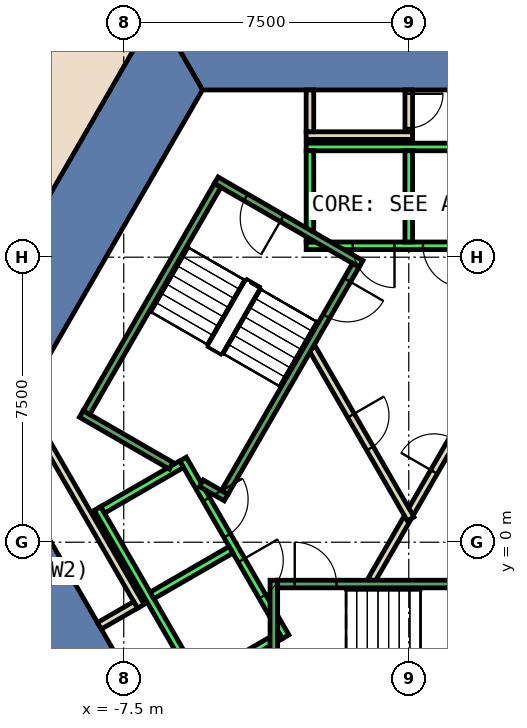
"""IFC4 building model, lengths in metres.
Left out: names, types, materials, properties, quantities, classifications, styles, units other than length and angle.
Written with IfcOpenShell. Run it as: python <this file> out.ifc"""

import sys

from ifc_helpers import new_model, si_unit, direction, frame, frame_2d, origin, place, context, subcontext, project, spatial, polyline, rectangle, outline, extrude, element, fill, save


model = new_model("IFC4")
c1 = context("Model", 3, precision=1e-05, world=origin(), true_north=direction((0.0, 1.0)))
c2 = subcontext(c1, "Body", "Model", "MODEL_VIEW")
j1 = project(units=[si_unit("LENGTHUNIT", "METRE"), si_unit("PLANEANGLEUNIT", "RADIAN")], contexts=[c1])
p1 = place(None, origin())
s1 = spatial("IfcSite", under=j1, at=p1, CompositionType="ELEMENT")
p2 = place(p1, origin())
s2 = spatial("IfcBuilding", under=s1, at=p2, CompositionType="ELEMENT")
p3 = place(p2, frame((0.0, 0.0, 236.0)))
s3 = spatial("IfcBuildingStorey", under=s2, at=p3, CompositionType="ELEMENT", Elevation=236.0)
p4 = place(p3, frame((0.0, 0.0, -0.6)))
e1 = element("IfcWall", 1, at=p4, inside=s3, PredefinedType="SHEAR", context=c2, shape_type="SweptSolid", body=[
    extrude(outline(polyline([(6.64, 14.0), (-6.64, 14.0), (-5.427, 11.9), (5.427, 11.9), (6.64, 14.0)])), origin(), (0.0, 0.0, 1.0), 5.4),
])
p5 = place(p3, frame((0.0, 0.0, -0.6)))
e2 = element("IfcWall", 2, at=p5, inside=s3, PredefinedType="SHEAR", context=c2, shape_type="SweptSolid", body=[
    extrude(outline(polyline([(-11.834, 5.002), (-10.016, 3.952), (-5.427, 11.9), (-6.64, 14.0), (-11.834, 5.002)])), origin(), (0.0, 0.0, 1.0), 5.4),
])
p6 = place(p3, frame((0.0, 0.0, -0.6)))
e3 = element("IfcWall", 3, at=p6, inside=s3, PredefinedType="SHEAR", context=c2, shape_type="SweptSolid", body=[
    extrude(outline(polyline([(-13.279, 2.5), (-6.64, -9.0), (-5.427, -6.9), (-10.854, 2.5), (-13.279, 2.5)])), origin(), (0.0, 0.0, 1.0), 5.4),
])
p7 = place(p3, frame((0.0, 11.9, 0.0), z_axis=(0.0, 0.0, 1.0), x_axis=(0.0, -1.0, 0.0)))
e4 = element("IfcWall", 4, at=p7, inside=s3, PredefinedType="PARTITIONING", context=c2, shape_type="SweptSolid", body=[
    extrude(rectangle(XDim=1.1, YDim=0.2, at=frame_2d((0.55, 0.0))), origin(), (0.0, 0.0, 1.0), 4.8),
])
p8 = place(p7, frame((0.1, 0.0, 0.0)))
e5 = element("IfcOpeningElement", 5, at=p8, cuts=e4, PredefinedType="OPENING", context=c2, shape_type="SweptSolid", body=[
    extrude(rectangle(XDim=0.9, YDim=2.1, at=frame_2d((0.45, 1.05))), frame((0.0, 0.11, 0.0), z_axis=(0.0, -1.0, 0.0), x_axis=(1.0, 0.0, 0.0)), (0.0, 0.0, 1.0), 0.22),
])
p9 = place(p3, frame((0.1, 10.7, 0.0), z_axis=(0.0, 0.0, 1.0), x_axis=(-1.0, 0.0, 0.0)))
e6 = element("IfcWall", 6, at=p9, inside=s3, PredefinedType="PARTITIONING", context=c2, shape_type="SweptSolid", body=[
    extrude(rectangle(XDim=2.8, YDim=0.2, at=frame_2d((1.4, 0.0))), origin(), (0.0, 0.0, 1.0), 4.8),
])
p10 = place(p3, frame((-2.6, 10.8, 0.0), z_axis=(0.0, 0.0, 1.0), x_axis=(0.0, 1.0, 0.0)))
e7 = element("IfcWall", 7, at=p10, inside=s3, PredefinedType="PARTITIONING", context=c2, shape_type="SweptSolid", body=[
    extrude(rectangle(XDim=1.1, YDim=0.2, at=frame_2d((0.55, 0.0))), origin(), (0.0, 0.0, 1.0), 4.8),
])
p11 = place(p3, frame((-9.751, 2.99, 0.0), z_axis=(0.0, 0.0, 1.0), x_axis=(0.499955951776, -0.866050833545, 0.0)))
e8 = element("IfcWall", 8, at=p11, inside=s3, PredefinedType="PARTITIONING", context=c2, shape_type="SweptSolid", body=[
    extrude(rectangle(XDim=5.4, YDim=0.2, at=frame_2d((2.7, 0.0))), origin(), (0.0, 0.0, 1.0), 4.8),
])
p12 = place(p3, frame((-7.188, -1.65, 0.0), z_axis=(0.0, 0.0, 1.0), x_axis=(-0.865841558281, -0.500318294642, 0.0)))
e9 = element("IfcWall", 9, at=p12, inside=s3, PredefinedType="PARTITIONING", context=c2, shape_type="SweptSolid", body=[
    extrude(rectangle(XDim=1.099, YDim=0.2, at=frame_2d((0.55, 0.0))), origin(), (0.0, 0.0, 1.0), 4.8),
])
p13 = place(p3, frame((-0.982, -1.0, 0.0), z_axis=(0.0, 0.0, 1.0), x_axis=(0.50024047865, 0.865886518847, 0.0)))
e10 = element("IfcWall", 10, at=p13, inside=s3, PredefinedType="PARTITIONING", context=c2, shape_type="SweptSolid", body=[
    extrude(rectangle(XDim=1.863, YDim=0.2, at=frame_2d((0.931, 0.0))), origin(), (0.0, 0.0, 1.0), 4.8),
])
p14 = place(p3, frame((0.05, 0.787, 0.0), z_axis=(0.0, 0.0, 1.0), x_axis=(0.499954076797, 0.866051915934, 0.0)))
e11 = element("IfcWall", 11, at=p14, inside=s3, PredefinedType="PARTITIONING", context=c2, shape_type="SweptSolid", body=[
    extrude(rectangle(XDim=3.558, YDim=0.2, at=frame_2d((1.779, 0.0))), origin(), (0.0, 0.0, 1.0), 4.8),
])
p15 = place(p14, frame((1.229, 0.0, 0.0)))
e12 = element("IfcOpeningElement", 12, at=p15, cuts=e11, PredefinedType="OPENING", context=c2, shape_type="SweptSolid", body=[
    extrude(rectangle(XDim=1.0, YDim=2.1, at=frame_2d((0.5, 1.05))), frame((0.0, 0.11, 0.0), z_axis=(0.0, -1.0, 0.0), x_axis=(1.0, 0.0, 0.0)), (0.0, 0.0, 1.0), 0.22),
])
p16 = place(p3, frame((-2.54, 5.1, 0.0), z_axis=(0.0, 0.0, 1.0), x_axis=(0.499925051871, -0.866068670783, 0.0)))
e13 = element("IfcWall", 13, at=p16, inside=s3, PredefinedType="PARTITIONING", context=c2, shape_type="SweptSolid", body=[
    extrude(rectangle(XDim=5.181, YDim=0.2, at=frame_2d((2.59, 0.0))), origin(), (0.0, 0.0, 1.0), 4.8),
])
p17 = place(p16, frame((2.04, 0.0, 0.0)))
e14 = element("IfcOpeningElement", 14, at=p17, cuts=e13, PredefinedType="OPENING", context=c2, shape_type="SweptSolid", body=[
    extrude(rectangle(XDim=1.0, YDim=2.1, at=frame_2d((0.5, 1.05))), frame((0.0, 0.11, 0.0), z_axis=(0.0, -1.0, 0.0), x_axis=(1.0, 0.0, 0.0)), (0.0, 0.0, 1.0), 0.22),
])
p18 = place(p3, frame((-12.57, 8.528, 0.0), z_axis=(0.0, 0.0, 1.0), x_axis=(0.499907967521, 0.866078532241, 0.0)))
e15 = element("IfcWall", 15, at=p18, inside=s3, PredefinedType="PARTITIONING", context=c2, shape_type="SweptSolid", body=[
    extrude(rectangle(XDim=9.19, YDim=0.2, at=frame_2d((4.595, 0.0))), origin(), (0.0, 0.0, 1.0), 4.8),
])
p19 = place(p18, frame((7.535, 0.0, 0.0)))
e16 = element("IfcOpeningElement", 16, at=p19, cuts=e15, PredefinedType="OPENING", context=c2, shape_type="SweptSolid", body=[
    extrude(rectangle(XDim=1.0, YDim=2.1, at=frame_2d((0.5, 1.05))), frame((0.0, 0.11, 0.0), z_axis=(0.0, -1.0, 0.0), x_axis=(1.0, 0.0, 0.0)), (0.0, 0.0, 1.0), 0.22),
])
p20 = place(p3, frame((2.7, 7.8, 0.0), z_axis=(0.0, 0.0, 1.0), x_axis=(-1.0, 0.0, 0.0)))
e17 = element("IfcWall", 17, at=p20, inside=s3, PredefinedType="STANDARD", context=c2, shape_type="SweptSolid", body=[
    extrude(rectangle(XDim=5.4, YDim=0.2, at=frame_2d((2.7, 0.0))), origin(), (0.0, 0.0, 1.0), 4.8),
])
p21 = place(p20, frame((1.225, 0.0, 0.0)))
e18 = element("IfcOpeningElement", 18, at=p21, cuts=e17, PredefinedType="OPENING", context=c2, shape_type="SweptSolid", body=[
    extrude(rectangle(XDim=1.1, YDim=2.1, at=frame_2d((0.55, 1.05))), frame((0.0, 0.11, 0.0), z_axis=(0.0, -1.0, 0.0), x_axis=(1.0, 0.0, 0.0)), (0.0, 0.0, 1.0), 0.22),
])
p22 = place(p20, frame((3.075, 0.0, 0.0)))
e19 = element("IfcOpeningElement", 19, at=p22, cuts=e17, PredefinedType="OPENING", context=c2, shape_type="SweptSolid", body=[
    extrude(rectangle(XDim=1.1, YDim=2.1, at=frame_2d((0.55, 1.05))), frame((0.0, 0.11, 0.0), z_axis=(0.0, -1.0, 0.0), x_axis=(1.0, 0.0, 0.0)), (0.0, 0.0, 1.0), 0.22),
])
p23 = place(p3, frame((2.7, 10.4, 0.0), z_axis=(0.0, 0.0, 1.0), x_axis=(-1.0, 0.0, 0.0)))
e20 = element("IfcWall", 20, at=p23, inside=s3, PredefinedType="STANDARD", context=c2, shape_type="SweptSolid", body=[
    extrude(rectangle(XDim=5.4, YDim=0.2, at=frame_2d((2.7, 0.0))), origin(), (0.0, 0.0, 1.0), 4.8),
])
for number, where, z_axis, x_axis in (
    (21, (0.0, 7.9, 0.0), (0.0, 0.0, 1.0), (0.0, 1.0, 0.0)),
    (22, (-2.6, 7.9, 0.0), (0.0, 0.0, 1.0), (0.0, 1.0, 0.0)),
):
    element("IfcWall", number, at=place(p3, frame(where, z_axis=z_axis, x_axis=x_axis)), inside=s3, PredefinedType="STANDARD", context=c2, shape_type="SweptSolid", body=[
        extrude(rectangle(XDim=2.4, YDim=0.2, at=frame_2d((1.2, 0.0))), origin(), (0.0, 0.0, 1.0), 4.8),
    ])
p24 = place(p3, frame((-5.94, 2.188, 0.0), z_axis=(0.0, 0.0, 1.0), x_axis=(0.500034260056, -0.866005622828, 0.0)))
e23 = element("IfcWall", 23, at=p24, inside=s3, PredefinedType="STANDARD", context=c2, shape_type="SweptSolid", body=[
    extrude(rectangle(XDim=5.399, YDim=0.2, at=frame_2d((2.7, 0.0))), origin(), (0.0, 0.0, 1.0), 4.8),
])
p25 = place(p24, frame((3.075, 0.0, 0.0)))
e24 = element("IfcOpeningElement", 24, at=p25, cuts=e23, PredefinedType="OPENING", context=c2, shape_type="SweptSolid", body=[
    extrude(rectangle(XDim=1.1, YDim=2.1, at=frame_2d((0.55, 1.05))), frame((0.0, 0.11, 0.0), z_axis=(0.0, -1.0, 0.0), x_axis=(1.0, 0.0, 0.0)), (0.0, 0.0, 1.0), 0.22),
])
p26 = place(p24, frame((1.225, 0.0, 0.0)))
e25 = element("IfcOpeningElement", 25, at=p26, cuts=e23, PredefinedType="OPENING", context=c2, shape_type="SweptSolid", body=[
    extrude(rectangle(XDim=1.1, YDim=2.1, at=frame_2d((0.55, 1.05))), frame((0.0, 0.11, 0.0), z_axis=(0.0, -1.0, 0.0), x_axis=(1.0, 0.0, 0.0)), (0.0, 0.0, 1.0), 0.22),
])
p27 = place(p3, frame((-8.192, 0.888, 0.0), z_axis=(0.0, 0.0, 1.0), x_axis=(0.500034260056, -0.866005622828, 0.0)))
e26 = element("IfcWall", 26, at=p27, inside=s3, PredefinedType="STANDARD", context=c2, shape_type="SweptSolid", body=[
    extrude(rectangle(XDim=5.399, YDim=0.2, at=frame_2d((2.7, 0.0))), origin(), (0.0, 0.0, 1.0), 4.8),
])
for number, where, z_axis, x_axis in (
    (27, (-5.977, 2.052, 0.0), (0.0, 0.0, 1.0), (-0.866, -0.5, 0.0)),
    (28, (-4.677, -0.2, 0.0), (0.0, 0.0, 1.0), (-0.866, -0.5, 0.0)),
):
    element("IfcWall", number, at=place(p3, frame(where, z_axis=z_axis, x_axis=x_axis)), inside=s3, PredefinedType="STANDARD", context=c2, shape_type="SweptSolid", body=[
        extrude(rectangle(XDim=2.399, YDim=0.2, at=frame_2d((1.2, 0.0))), origin(), (0.0, 0.0, 1.0), 4.8),
    ])
p28 = place(p3, frame((-3.377, -2.452, 0.0), z_axis=(0.0, 0.0, 1.0), x_axis=(-0.865955154139, -0.50012165622, 0.0)))
e29 = element("IfcWall", 29, at=p28, inside=s3, PredefinedType="STANDARD", context=c2, shape_type="SweptSolid", body=[
    extrude(rectangle(XDim=2.4, YDim=0.2, at=frame_2d((1.2, 0.0))), origin(), (0.0, 0.0, 1.0), 4.8),
])
p29 = place(p3, frame((-3.55, -1.0, 0.0), z_axis=(0.0, 0.0, 1.0), x_axis=(0.0, -1.0, 0.0)))
e30 = element("IfcWall", 30, at=p29, inside=s3, PredefinedType="STANDARD", context=c2, shape_type="SweptSolid", body=[
    extrude(rectangle(XDim=4.4, YDim=0.2, at=frame_2d((2.2, 0.0))), origin(), (0.0, 0.0, 1.0), 4.8),
])
p30 = place(p29, frame((2.4, 0.0, 0.0)))
e31 = element("IfcOpeningElement", 31, at=p30, cuts=e30, PredefinedType="OPENING", context=c2, shape_type="SweptSolid", body=[
    extrude(rectangle(XDim=1.1, YDim=2.2, at=frame_2d((0.55, 1.1))), frame((0.0, 0.11, 0.0), z_axis=(0.0, -1.0, 0.0), x_axis=(1.0, 0.0, 0.0)), (0.0, 0.0, 1.0), 0.22),
])
p31 = place(p3, frame((-3.45, -1.1, 0.0), z_axis=(0.0, 0.0, 1.0), x_axis=(1.0, 0.0, 0.0)))
e32 = element("IfcWall", 32, at=p31, inside=s3, PredefinedType="STANDARD", context=c2, shape_type="SweptSolid", body=[
    extrude(rectangle(XDim=6.9, YDim=0.2, at=frame_2d((3.45, 0.0))), origin(), (0.0, 0.0, 1.0), 4.8),
])
p32 = place(p31, frame((0.45, 0.0, 0.0)))
e33 = element("IfcOpeningElement", 33, at=p32, cuts=e32, PredefinedType="OPENING", context=c2, shape_type="SweptSolid", body=[
    extrude(rectangle(XDim=1.1, YDim=2.2, at=frame_2d((0.55, 1.1))), frame((0.0, 0.11, 0.0), z_axis=(0.0, -1.0, 0.0), x_axis=(1.0, 0.0, 0.0)), (0.0, 0.0, 1.0), 0.22),
])
p33 = place(p3, frame((-1.256, 7.324, 0.0), z_axis=(0.0, 0.0, 1.0), x_axis=(-0.866046073146, 0.499964197906, 0.0)))
e34 = element("IfcWall", 34, at=p33, inside=s3, PredefinedType="STANDARD", context=c2, shape_type="SweptSolid", body=[
    extrude(rectangle(XDim=4.4, YDim=0.2, at=frame_2d((2.2, 0.0))), origin(), (0.0, 0.0, 1.0), 4.8),
])
p34 = place(p33, frame((2.4, 0.0, 0.0)))
e35 = element("IfcOpeningElement", 35, at=p34, cuts=e34, PredefinedType="OPENING", context=c2, shape_type="SweptSolid", body=[
    extrude(rectangle(XDim=1.1, YDim=2.2, at=frame_2d((0.55, 1.1))), frame((0.0, 0.11, 0.0), z_axis=(0.0, -1.0, 0.0), x_axis=(1.0, 0.0, 0.0)), (0.0, 0.0, 1.0), 0.22),
])
p35 = place(p3, frame((-6.25, 2.01, 0.0), z_axis=(0.0, 0.0, 1.0), x_axis=(-0.86611865017, 0.499838457731, 0.0)))
e36 = element("IfcWall", 36, at=p35, inside=s3, PredefinedType="STANDARD", context=c2, shape_type="SweptSolid", body=[
    extrude(rectangle(XDim=2.733, YDim=0.2, at=frame_2d((1.366, 0.0))), origin(), (0.0, 0.0, 1.0), 4.8),
])
p36 = place(p3, frame((-4.806, 1.176, 0.0), z_axis=(0.0, 0.0, 1.0), x_axis=(-0.866558586415, 0.499075361355, 0.0)))
e37 = element("IfcWall", 37, at=p36, inside=s3, PredefinedType="STANDARD", context=c2, shape_type="SweptSolid", body=[
    extrude(rectangle(XDim=0.751, YDim=0.2, at=frame_2d((0.376, 0.0))), origin(), (0.0, 0.0, 1.0), 4.8),
])
p37 = place(p3, frame((-1.393, 7.288, 0.0), z_axis=(0.0, 0.0, 1.0), x_axis=(-0.499963383562, -0.866046543262, 0.0)))
e38 = element("IfcWall", 38, at=p37, inside=s3, PredefinedType="STANDARD", context=c2, shape_type="SweptSolid", body=[
    extrude(rectangle(XDim=6.9, YDim=0.2, at=frame_2d((3.45, 0.0))), origin(), (0.0, 0.0, 1.0), 4.8),
])
p38 = place(p37, frame((0.45, 0.0, 0.0)))
e39 = element("IfcOpeningElement", 39, at=p38, cuts=e38, PredefinedType="OPENING", context=c2, shape_type="SweptSolid", body=[
    extrude(rectangle(XDim=1.1, YDim=2.2, at=frame_2d((0.55, 1.1))), frame((0.0, 0.11, 0.0), z_axis=(0.0, -1.0, 0.0), x_axis=(1.0, 0.0, 0.0)), (0.0, 0.0, 1.0), 0.22),
])
p39 = place(p3, frame((-5.03, 9.388, 0.0), z_axis=(0.0, 0.0, 1.0), x_axis=(-0.499978703459, -0.866037698999, 0.0)))
e40 = element("IfcWall", 40, at=p39, inside=s3, PredefinedType="STANDARD", context=c2, shape_type="SweptSolid", body=[
    extrude(rectangle(XDim=6.9, YDim=0.2, at=frame_2d((3.45, 0.0))), origin(), (0.0, 0.0, 1.0), 4.8),
])
p40 = place(p15, origin())
e41 = element("IfcDoor", 41, at=p40, inside=s3, OperationType="SINGLE_SWING_RIGHT", PredefinedType="DOOR", context=c2, shape_type="SweptSolid", body=[
    extrude(rectangle(XDim=1.0, YDim=2.1, at=frame_2d((0.5, 1.05))), frame((0.0, 0.025, 0.0), z_axis=(0.0, -1.0, 0.0), x_axis=(1.0, 0.0, 0.0)), (0.0, 0.0, 1.0), 0.05),
])
fill(e12, e41)
p41 = place(p17, origin())
e42 = element("IfcDoor", 42, at=p41, inside=s3, OperationType="SINGLE_SWING_RIGHT", PredefinedType="DOOR", context=c2, shape_type="SweptSolid", body=[
    extrude(rectangle(XDim=1.0, YDim=2.1, at=frame_2d((0.5, 1.05))), frame((0.0, 0.025, 0.0), z_axis=(0.0, -1.0, 0.0), x_axis=(1.0, 0.0, 0.0)), (0.0, 0.0, 1.0), 0.05),
])
fill(e14, e42)
p42 = place(p8, origin())
e43 = element("IfcDoor", 43, at=p42, inside=s3, OperationType="SINGLE_SWING_LEFT", PredefinedType="DOOR", context=c2, shape_type="SweptSolid", body=[
    extrude(rectangle(XDim=0.9, YDim=2.1, at=frame_2d((0.45, 1.05))), frame((0.0, 0.025, 0.0), z_axis=(0.0, -1.0, 0.0), x_axis=(1.0, 0.0, 0.0)), (0.0, 0.0, 1.0), 0.05),
])
fill(e5, e43)
p43 = place(p21, origin())
e44 = element("IfcDoor", 44, at=p43, inside=s3, OperationType="SLIDING_TO_LEFT", PredefinedType="DOOR", context=c2, shape_type="SweptSolid", body=[
    extrude(rectangle(XDim=1.1, YDim=2.1, at=frame_2d((0.55, 1.05))), frame((0.0, 0.025, 0.0), z_axis=(0.0, -1.0, 0.0), x_axis=(1.0, 0.0, 0.0)), (0.0, 0.0, 1.0), 0.05),
])
fill(e18, e44)
p44 = place(p22, origin())
e45 = element("IfcDoor", 45, at=p44, inside=s3, OperationType="SLIDING_TO_LEFT", PredefinedType="DOOR", context=c2, shape_type="SweptSolid", body=[
    extrude(rectangle(XDim=1.1, YDim=2.1, at=frame_2d((0.55, 1.05))), frame((0.0, 0.025, 0.0), z_axis=(0.0, -1.0, 0.0), x_axis=(1.0, 0.0, 0.0)), (0.0, 0.0, 1.0), 0.05),
])
fill(e19, e45)
p45 = place(p25, origin())
e46 = element("IfcDoor", 46, at=p45, inside=s3, OperationType="SLIDING_TO_LEFT", PredefinedType="DOOR", context=c2, shape_type="SweptSolid", body=[
    extrude(rectangle(XDim=1.1, YDim=2.1, at=frame_2d((0.55, 1.05))), frame((0.0, 0.025, 0.0), z_axis=(0.0, -1.0, 0.0), x_axis=(1.0, 0.0, 0.0)), (0.0, 0.0, 1.0), 0.05),
])
fill(e24, e46)
p46 = place(p26, origin())
e47 = element("IfcDoor", 47, at=p46, inside=s3, OperationType="SLIDING_TO_LEFT", PredefinedType="DOOR", context=c2, shape_type="SweptSolid", body=[
    extrude(rectangle(XDim=1.1, YDim=2.1, at=frame_2d((0.55, 1.05))), frame((0.0, 0.025, 0.0), z_axis=(0.0, -1.0, 0.0), x_axis=(1.0, 0.0, 0.0)), (0.0, 0.0, 1.0), 0.05),
])
fill(e25, e47)
p47 = place(p32, origin())
e48 = element("IfcDoor", 48, at=p47, inside=s3, OperationType="SINGLE_SWING_LEFT", PredefinedType="DOOR", context=c2, shape_type="SweptSolid", body=[
    extrude(rectangle(XDim=1.1, YDim=2.2, at=frame_2d((0.55, 1.1))), frame((0.0, 0.025, 0.0), z_axis=(0.0, -1.0, 0.0), x_axis=(1.0, 0.0, 0.0)), (0.0, 0.0, 1.0), 0.05),
])
fill(e33, e48)
p48 = place(p38, origin())
e49 = element("IfcDoor", 49, at=p48, inside=s3, OperationType="SINGLE_SWING_LEFT", PredefinedType="DOOR", context=c2, shape_type="SweptSolid", body=[
    extrude(rectangle(XDim=1.1, YDim=2.2, at=frame_2d((0.55, 1.1))), frame((0.0, 0.025, 0.0), z_axis=(0.0, -1.0, 0.0), x_axis=(1.0, 0.0, 0.0)), (0.0, 0.0, 1.0), 0.05),
])
fill(e39, e49)
p49 = place(p34, origin())
e50 = element("IfcDoor", 50, at=p49, inside=s3, OperationType="SINGLE_SWING_LEFT", PredefinedType="DOOR", context=c2, shape_type="SweptSolid", body=[
    extrude(rectangle(XDim=1.1, YDim=2.2, at=frame_2d((0.55, 1.1))), frame((0.0, 0.025, 0.0), z_axis=(0.0, -1.0, 0.0), x_axis=(1.0, 0.0, 0.0)), (0.0, 0.0, 1.0), 0.05),
])
fill(e35, e50)
save(model, sys.argv[1])
